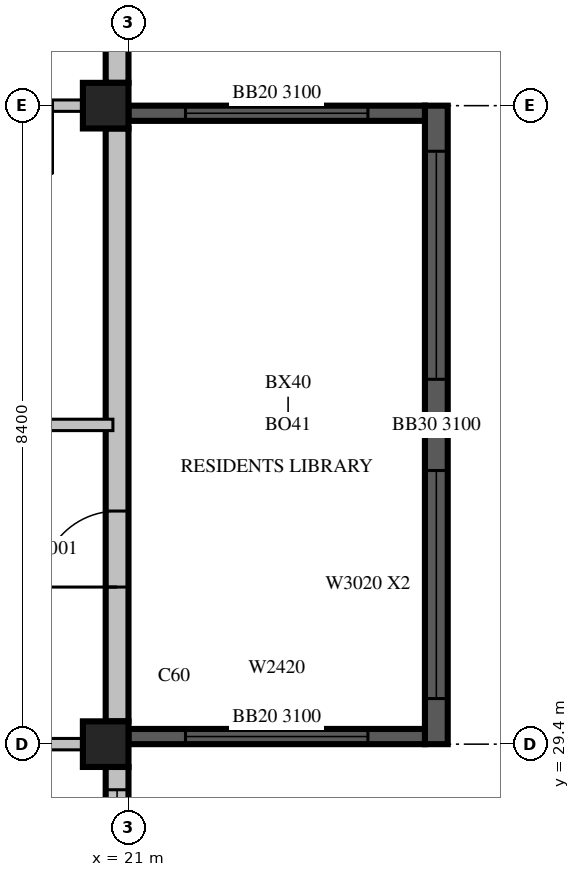
"""IFC4 building model, lengths in metres.
Left out: names, types, materials, properties, quantities, classifications, styles, units other than length and angle.
Written with IfcOpenShell. Run it as: python <this file> out.ifc"""

import sys

from ifc_helpers import new_model, si_unit, direction, frame, frame_2d, origin, origin_2d, place, context, subcontext, project, spatial, rectangle, extrude, source, transform, mapped, element, fill, save


model = new_model("IFC4")
c1 = context("Model", 3, precision=1e-05, world=origin(), true_north=direction((0.0, 1.0)))
c2 = subcontext(c1, "Body", "Model", "MODEL_VIEW")
j1 = project(units=[si_unit("LENGTHUNIT", "METRE"), si_unit("PLANEANGLEUNIT", "RADIAN")], contexts=[c1])
p1 = place(None, origin())
s1 = spatial("IfcSite", under=j1, at=p1, CompositionType="ELEMENT")
p2 = place(p1, origin())
s2 = spatial("IfcBuilding", under=s1, at=p2, CompositionType="ELEMENT")
p3 = place(p2, frame((0.0, 0.0, 333.5)))
s3 = spatial("IfcBuildingStorey", under=s2, at=p3, CompositionType="ELEMENT", Elevation=333.5)
m1 = source(origin(), c2, "Body", "SweptSolid", [
    extrude(rectangle(XDim=0.6, YDim=0.6, at=origin_2d()), origin(), (0.0, 0.0, 1.0), 3.5),
])
for number, where, z_axis, x_axis in (
    (1, (20.7, 29.4, 0.0), (0.0, 0.0, 1.0), (1.0, 0.0, 0.0)),
    (2, (20.7, 37.8, 0.0), (0.0, 0.0, 1.0), (1.0, 0.0, 0.0)),
):
    element("IfcColumn", number, at=place(p3, frame(where, z_axis=z_axis, x_axis=x_axis)), inside=s3, PredefinedType="COLUMN", context=c2, shape_type="MappedRepresentation", body=[
        mapped(m1, transform((0.0, 0.0, 0.0), scale=1.0)),
    ])
m2 = source(origin(), c2, "Body", "SweptSolid", [
    extrude(rectangle(XDim=8.4, YDim=0.3, at=frame_2d((4.2, 0.0))), origin(), (0.0, 0.0, 1.0), 3.1),
])
p4 = place(p3, frame((25.05, 29.4, 0.0), z_axis=(0.0, 0.0, 1.0), x_axis=(0.0, 1.0, 0.0)))
e3 = element("IfcWall", 3, at=p4, inside=s3, PredefinedType="SOLIDWALL", context=c2, shape_type="MappedRepresentation", body=[
    mapped(m2, transform((0.0, 0.0, 0.0), scale=1.0)),
])
m3 = source(origin(), c2, "Body", "SweptSolid", [
    extrude(rectangle(XDim=3.0, YDim=2.0, at=frame_2d((1.5, 1.0))), frame((0.0, 0.16, 0.0), z_axis=(0.0, -1.0, 0.0), x_axis=(1.0, 0.0, 0.0)), (0.0, 0.0, 1.0), 0.32),
])
p5 = place(p4, frame((0.6, 0.0, 0.6)))
e4 = element("IfcOpeningElement", 4, at=p5, cuts=e3, PredefinedType="OPENING", context=c2, shape_type="MappedRepresentation", body=[
    mapped(m3, transform((0.0, 0.0, 0.0), scale=1.0)),
])
p6 = place(p4, frame((4.8, 0.0, 0.6)))
e5 = element("IfcOpeningElement", 5, at=p6, cuts=e3, PredefinedType="OPENING", context=c2, shape_type="MappedRepresentation", body=[
    mapped(m3, transform((0.0, 0.0, 0.0), scale=1.0)),
])
m4 = source(origin(), c2, "Body", "SweptSolid", [
    extrude(rectangle(XDim=3.9, YDim=0.2, at=frame_2d((1.95, 0.0))), origin(), (0.0, 0.0, 1.0), 3.1),
])
p7 = place(p3, frame((21.0, 29.5, 0.0), z_axis=(0.0, 0.0, 1.0), x_axis=(1.0, 0.0, 0.0)))
e6 = element("IfcWall", 6, at=p7, inside=s3, PredefinedType="SOLIDWALL", context=c2, shape_type="MappedRepresentation", body=[
    mapped(m4, transform((0.0, 0.0, 0.0), scale=1.0)),
])
m5 = source(origin(), c2, "Body", "SweptSolid", [
    extrude(rectangle(XDim=2.4, YDim=2.0, at=frame_2d((1.2, 1.0))), frame((0.0, 0.11, 0.0), z_axis=(0.0, -1.0, 0.0), x_axis=(1.0, 0.0, 0.0)), (0.0, 0.0, 1.0), 0.22),
])
p8 = place(p7, frame((0.75, 0.0, 0.6)))
e7 = element("IfcOpeningElement", 7, at=p8, cuts=e6, PredefinedType="OPENING", context=c2, shape_type="MappedRepresentation", body=[
    mapped(m5, transform((0.0, 0.0, 0.0), scale=1.0)),
])
p9 = place(p3, frame((21.0, 37.7, 0.0), z_axis=(0.0, 0.0, 1.0), x_axis=(1.0, 0.0, 0.0)))
e8 = element("IfcWall", 8, at=p9, inside=s3, PredefinedType="SOLIDWALL", context=c2, shape_type="MappedRepresentation", body=[
    mapped(m4, transform((0.0, 0.0, 0.0), scale=1.0)),
])
p10 = place(p9, frame((0.75, 0.0, 0.6)))
e9 = element("IfcOpeningElement", 9, at=p10, cuts=e8, PredefinedType="OPENING", context=c2, shape_type="MappedRepresentation", body=[
    mapped(m5, transform((0.0, 0.0, 0.0), scale=1.0)),
])
m6 = source(origin(), c2, "Body", "SweptSolid", [
    extrude(rectangle(XDim=7.5, YDim=0.3, at=frame_2d((3.75, 0.0))), origin(), (0.0, 0.0, 1.0), 3.1),
])
p11 = place(p3, frame((20.85, 21.6, 0.0), z_axis=(0.0, 0.0, 1.0), x_axis=(0.0, 1.0, 0.0)))
e10 = element("IfcWall", 10, at=p11, inside=s3, PredefinedType="STANDARD", context=c2, shape_type="MappedRepresentation", body=[
    mapped(m6, transform((0.0, 0.0, 0.0), scale=1.0)),
])
m7 = source(origin(), c2, "Body", "SweptSolid", [
    extrude(rectangle(XDim=1.8, YDim=2.0, at=frame_2d((0.9, 1.0))), frame((0.0, 0.16, 0.0), z_axis=(0.0, -1.0, 0.0), x_axis=(1.0, 0.0, 0.0)), (0.0, 0.0, 1.0), 0.32),
])
p12 = place(p11, frame((0.463, 0.0, 0.6)))
e11 = element("IfcOpeningElement", 11, at=p12, cuts=e10, PredefinedType="OPENING", context=c2, shape_type="MappedRepresentation", body=[
    mapped(m7, transform((0.0, 0.0, 0.0), scale=1.0)),
])
p13 = place(p11, frame((4.2, 0.0, 0.6)))
e12 = element("IfcOpeningElement", 12, at=p13, cuts=e10, PredefinedType="OPENING", context=c2, shape_type="MappedRepresentation", body=[
    mapped(m3, transform((0.0, 0.0, 0.0), scale=1.0)),
])
m8 = source(origin(), c2, "Body", "SweptSolid", [
    extrude(rectangle(XDim=7.8, YDim=0.3, at=frame_2d((3.9, 0.0))), origin(), (0.0, 0.0, 1.0), 3.1),
])
p14 = place(p3, frame((20.85, 29.7, 0.0), z_axis=(0.0, 0.0, 1.0), x_axis=(0.0, 1.0, 0.0)))
e13 = element("IfcWall", 13, at=p14, inside=s3, PredefinedType="STANDARD", context=c2, shape_type="MappedRepresentation", body=[
    mapped(m8, transform((0.0, 0.0, 0.0), scale=1.0)),
])
m9 = source(origin(), c2, "Body", "SweptSolid", [
    extrude(rectangle(XDim=1.0, YDim=2.1, at=frame_2d((0.5, 1.05))), frame((0.0, 0.16, 0.0), z_axis=(0.0, -1.0, 0.0), x_axis=(1.0, 0.0, 0.0)), (0.0, 0.0, 1.0), 0.32),
])
p15 = place(p14, frame((1.767, 0.0, 0.0)))
e14 = element("IfcOpeningElement", 14, at=p15, cuts=e13, PredefinedType="OPENING", context=c2, shape_type="MappedRepresentation", body=[
    mapped(m9, transform((0.0, 0.0, 0.0), scale=1.0)),
])
m10 = source(origin(), c2, "Body", "SweptSolid", [
    extrude(rectangle(XDim=5.58, YDim=0.3, at=frame_2d((2.79, 0.0))), origin(), (0.0, 0.0, 1.0), 3.1),
])
p16 = place(p3, frame((20.85, 38.1, 0.0), z_axis=(0.0, 0.0, 1.0), x_axis=(0.0, 1.0, 0.0)))
e15 = element("IfcWall", 15, at=p16, inside=s3, PredefinedType="STANDARD", context=c2, shape_type="MappedRepresentation", body=[
    mapped(m10, transform((0.0, 0.0, 0.0), scale=1.0)),
])
m11 = source(origin(), c2, "Body", "SweptSolid", [
    extrude(rectangle(XDim=3.6, YDim=2.0, at=frame_2d((1.8, 1.0))), frame((0.0, 0.16, 0.0), z_axis=(0.0, -1.0, 0.0), x_axis=(1.0, 0.0, 0.0)), (0.0, 0.0, 1.0), 0.32),
])
p17 = place(p16, frame((0.84, 0.0, 0.6)))
e16 = element("IfcOpeningElement", 16, at=p17, cuts=e15, PredefinedType="OPENING", context=c2, shape_type="MappedRepresentation", body=[
    mapped(m11, transform((0.0, 0.0, 0.0), scale=1.0)),
])
m12 = source(origin(), c2, "Body", "SweptSolid", [
    extrude(rectangle(XDim=9.302, YDim=0.15, at=frame_2d((4.651, 0.0))), origin(), (0.0, 0.0, 1.0), 3.1),
])
p18 = place(p3, frame((11.099, 29.4, 0.0), z_axis=(0.0, 0.0, 1.0), x_axis=(1.0, 0.0, 0.0)))
e17 = element("IfcWall", 17, at=p18, inside=s3, PredefinedType="PARTITIONING", context=c2, shape_type="MappedRepresentation", body=[
    mapped(m12, transform((0.0, 0.0, 0.0), scale=1.0)),
])
m13 = source(origin(), c2, "Body", "SweptSolid", [
    extrude(rectangle(XDim=1.2, YDim=2.1, at=frame_2d((0.6, 1.05))), frame((0.0, 0.085, 0.0), z_axis=(0.0, -1.0, 0.0), x_axis=(1.0, 0.0, 0.0)), (0.0, 0.0, 1.0), 0.17),
])
p19 = place(p18, frame((7.088, 0.0, 0.0)))
e18 = element("IfcOpeningElement", 18, at=p19, cuts=e17, PredefinedType="OPENING", context=c2, shape_type="MappedRepresentation", body=[
    mapped(m13, transform((0.0, 0.0, 0.0), scale=1.0)),
])
p20 = place(p3, frame((10.8, 33.6, 0.0), z_axis=(0.0, 0.0, 1.0), x_axis=(1.0, 0.0, 0.0)))
e19 = element("IfcWall", 19, at=p20, inside=s3, PredefinedType="PARTITIONING", context=c2, shape_type="SweptSolid", body=[
    extrude(rectangle(XDim=9.995, YDim=0.15, at=frame_2d((4.997, 0.0))), origin(), (0.0, 0.0, 1.0), 3.1),
])
p21 = place(p20, frame((4.7, 0.0, 0.0)))
e20 = element("IfcOpeningElement", 20, at=p21, cuts=e19, PredefinedType="OPENING", context=c2, shape_type="MappedRepresentation", body=[
    mapped(m13, transform((0.0, 0.0, 0.0), scale=1.0)),
])
p22 = place(p3, frame((20.401, 37.8, 0.0), z_axis=(0.0, 0.0, 1.0), x_axis=(-1.0, 0.0, 0.0)))
e21 = element("IfcWall", 21, at=p22, inside=s3, PredefinedType="PARTITIONING", context=c2, shape_type="MappedRepresentation", body=[
    mapped(m12, transform((0.0, 0.0, 0.0), scale=1.0)),
])
m14 = source(origin(), c2, "Body", "SweptSolid", [
    extrude(rectangle(XDim=0.9, YDim=2.1, at=frame_2d((0.45, 1.05))), frame((0.0, 0.085, 0.0), z_axis=(0.0, -1.0, 0.0), x_axis=(1.0, 0.0, 0.0)), (0.0, 0.0, 1.0), 0.17),
])
p23 = place(p22, frame((0.401, 0.0, 0.0)))
e22 = element("IfcOpeningElement", 22, at=p23, cuts=e21, PredefinedType="OPENING", context=c2, shape_type="MappedRepresentation", body=[
    mapped(m14, transform((0.0, 0.0, 0.0), scale=1.0)),
])
m15 = source(origin(), c2, "Body", "SweptSolid", [
    extrude(rectangle(XDim=3.0, YDim=2.0, at=frame_2d((1.5, 1.0))), frame((0.0, 0.03, 0.0), z_axis=(0.0, -1.0, 0.0), x_axis=(1.0, 0.0, 0.0)), (0.0, 0.0, 1.0), 0.06),
])
p24 = place(p5, origin())
e23 = element("IfcWindow", 23, at=p24, inside=s3, PartitioningType="SINGLE_PANEL", PredefinedType="WINDOW", context=c2, shape_type="MappedRepresentation", body=[
    mapped(m15, transform((0.0, 0.0, 0.0), scale=1.0)),
])
fill(e4, e23)
p25 = place(p6, origin())
e24 = element("IfcWindow", 24, at=p25, inside=s3, PartitioningType="SINGLE_PANEL", PredefinedType="WINDOW", context=c2, shape_type="MappedRepresentation", body=[
    mapped(m15, transform((0.0, 0.0, 0.0), scale=1.0)),
])
fill(e5, e24)
m16 = source(origin(), c2, "Body", "SweptSolid", [
    extrude(rectangle(XDim=2.4, YDim=2.0, at=frame_2d((1.2, 1.0))), frame((0.0, 0.03, 0.0), z_axis=(0.0, -1.0, 0.0), x_axis=(1.0, 0.0, 0.0)), (0.0, 0.0, 1.0), 0.06),
])
p26 = place(p8, origin())
e25 = element("IfcWindow", 25, at=p26, inside=s3, PartitioningType="SINGLE_PANEL", PredefinedType="WINDOW", context=c2, shape_type="MappedRepresentation", body=[
    mapped(m16, transform((0.0, 0.0, 0.0), scale=1.0)),
])
fill(e7, e25)
p27 = place(p10, origin())
e26 = element("IfcWindow", 26, at=p27, inside=s3, PartitioningType="SINGLE_PANEL", PredefinedType="WINDOW", context=c2, shape_type="MappedRepresentation", body=[
    mapped(m16, transform((0.0, 0.0, 0.0), scale=1.0)),
])
fill(e9, e26)
p28 = place(p13, origin())
e27 = element("IfcWindow", 27, at=p28, inside=s3, PartitioningType="SINGLE_PANEL", PredefinedType="WINDOW", context=c2, shape_type="MappedRepresentation", body=[
    mapped(m15, transform((0.0, 0.0, 0.0), scale=1.0)),
])
fill(e12, e27)
m17 = source(origin(), c2, "Body", "SweptSolid", [
    extrude(rectangle(XDim=1.0, YDim=2.1, at=frame_2d((0.5, 1.05))), frame((0.0, 0.025, 0.0), z_axis=(0.0, -1.0, 0.0), x_axis=(1.0, 0.0, 0.0)), (0.0, 0.0, 1.0), 0.05),
])
p29 = place(p15, origin())
e28 = element("IfcDoor", 28, at=p29, inside=s3, OperationType="SINGLE_SWING_LEFT", PredefinedType="DOOR", context=c2, shape_type="MappedRepresentation", body=[
    mapped(m17, transform((0.0, 0.0, 0.0), scale=1.0)),
])
fill(e14, e28)
save(model, sys.argv[1])
